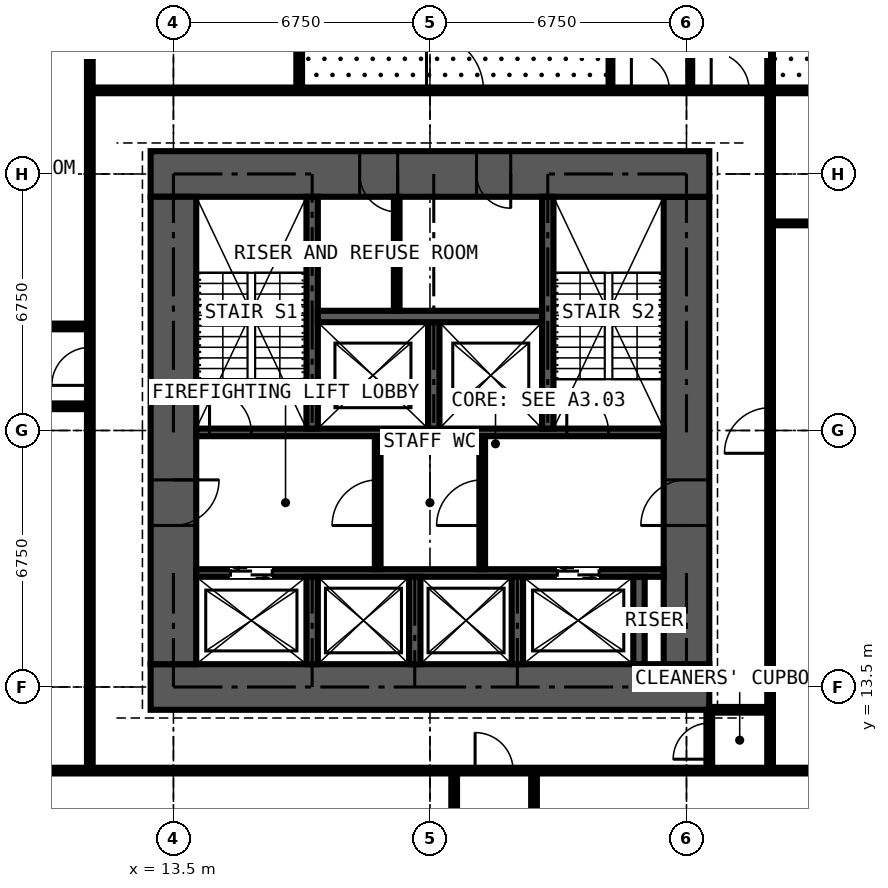
"""IFC4 building model, lengths in metres.
Left out: names, types, materials, properties, quantities, classifications, styles, units other than length and angle.
Written with IfcOpenShell. Run it as: python <this file> out.ifc"""

import sys

from ifc_helpers import new_model, si_unit, direction, frame, frame_2d, origin, place, context, subcontext, project, spatial, rectangle, extrude, element, fill, save


model = new_model("IFC4")
c1 = context("Model", 3, precision=1e-05, world=origin(), true_north=direction((0.0, 1.0)))
c2 = subcontext(c1, "Body", "Model", "MODEL_VIEW")
j1 = project(units=[si_unit("LENGTHUNIT", "METRE"), si_unit("PLANEANGLEUNIT", "RADIAN")], contexts=[c1])
p1 = place(None, origin())
s1 = spatial("IfcSite", under=j1, at=p1, CompositionType="ELEMENT")
p2 = place(p1, origin())
s2 = spatial("IfcBuilding", under=s1, at=p2, CompositionType="ELEMENT")
p3 = place(p2, frame((0.0, 0.0, 46.8)))
s3 = spatial("IfcBuildingStorey", under=s2, at=p3, CompositionType="ELEMENT", Elevation=46.8)
p4 = place(p3, frame((12.9, 13.5, 0.0), z_axis=(0.0, 0.0, 1.0), x_axis=(1.0, 0.0, 0.0)))
e1 = element("IfcWall", 1, at=p4, inside=s3, PredefinedType="SHEAR", context=c2, shape_type="SweptSolid", body=[
    extrude(rectangle(XDim=14.7, YDim=1.2, at=frame_2d((7.35, 0.0))), origin(), (0.0, 0.0, 1.0), 3.6),
])
p5 = place(p3, frame((27.0, 14.1, 0.0), z_axis=(0.0, 0.0, 1.0), x_axis=(0.0, 1.0, 0.0)))
e2 = element("IfcWall", 2, at=p5, inside=s3, PredefinedType="SHEAR", context=c2, shape_type="SweptSolid", body=[
    extrude(rectangle(XDim=12.3, YDim=1.2, at=frame_2d((6.15, 0.0))), origin(), (0.0, 0.0, 1.0), 3.6),
])
p6 = place(p5, frame((3.65, 0.0, 0.0)))
e3 = element("IfcOpeningElement", 3, at=p6, cuts=e2, PredefinedType="OPENING", context=c2, shape_type="SweptSolid", body=[
    extrude(rectangle(XDim=1.2, YDim=2.2, at=frame_2d((0.6, 1.1))), frame((0.0, 0.61, 0.0), z_axis=(0.0, -1.0, 0.0), x_axis=(1.0, 0.0, 0.0)), (0.0, 0.0, 1.0), 1.22),
])
p7 = place(p3, frame((27.6, 27.0, 0.0), z_axis=(0.0, 0.0, 1.0), x_axis=(-1.0, 0.0, 0.0)))
e4 = element("IfcWall", 4, at=p7, inside=s3, PredefinedType="SHEAR", context=c2, shape_type="SweptSolid", body=[
    extrude(rectangle(XDim=14.7, YDim=1.2, at=frame_2d((7.35, 0.0))), origin(), (0.0, 0.0, 1.0), 3.6),
])
p8 = place(p7, frame((5.225, 0.0, 0.0)))
e5 = element("IfcOpeningElement", 5, at=p8, cuts=e4, PredefinedType="OPENING", context=c2, shape_type="SweptSolid", body=[
    extrude(rectangle(XDim=0.9, YDim=2.2, at=frame_2d((0.45, 1.1))), frame((0.0, 0.61, 0.0), z_axis=(0.0, -1.0, 0.0), x_axis=(1.0, 0.0, 0.0)), (0.0, 0.0, 1.0), 1.22),
])
p9 = place(p7, frame((8.2, 0.0, 0.0)))
e6 = element("IfcOpeningElement", 6, at=p9, cuts=e4, PredefinedType="OPENING", context=c2, shape_type="SweptSolid", body=[
    extrude(rectangle(XDim=1.0, YDim=2.2, at=frame_2d((0.5, 1.1))), frame((0.0, 0.61, 0.0), z_axis=(0.0, -1.0, 0.0), x_axis=(1.0, 0.0, 0.0)), (0.0, 0.0, 1.0), 1.22),
])
p10 = place(p3, frame((13.5, 26.4, 0.0), z_axis=(0.0, 0.0, 1.0), x_axis=(0.0, -1.0, 0.0)))
e7 = element("IfcWall", 7, at=p10, inside=s3, PredefinedType="SHEAR", context=c2, shape_type="SweptSolid", body=[
    extrude(rectangle(XDim=12.3, YDim=1.2, at=frame_2d((6.15, 0.0))), origin(), (0.0, 0.0, 1.0), 3.6),
])
p11 = place(p10, frame((7.45, 0.0, 0.0)))
e8 = element("IfcOpeningElement", 8, at=p11, cuts=e7, PredefinedType="OPENING", context=c2, shape_type="SweptSolid", body=[
    extrude(rectangle(XDim=1.2, YDim=2.2, at=frame_2d((0.6, 1.1))), frame((0.0, 0.61, 0.0), z_axis=(0.0, -1.0, 0.0), x_axis=(1.0, 0.0, 0.0)), (0.0, 0.0, 1.0), 1.22),
])
p12 = place(p3, frame((14.1, 16.5, 0.0), z_axis=(0.0, 0.0, 1.0), x_axis=(1.0, 0.0, 0.0)))
e9 = element("IfcWall", 9, at=p12, inside=s3, PredefinedType="SHEAR", context=c2, shape_type="SweptSolid", body=[
    extrude(rectangle(XDim=12.3, YDim=0.2, at=frame_2d((6.15, 0.0))), origin(), (0.0, 0.0, 1.0), 3.6),
])
p13 = place(p12, frame((0.9, 0.0, 0.0)))
e10 = element("IfcOpeningElement", 10, at=p13, cuts=e9, PredefinedType="OPENING", context=c2, shape_type="SweptSolid", body=[
    extrude(rectangle(XDim=1.1, YDim=2.2, at=frame_2d((0.55, 1.1))), frame((0.0, 0.11, 0.0), z_axis=(0.0, -1.0, 0.0), x_axis=(1.0, 0.0, 0.0)), (0.0, 0.0, 1.0), 0.22),
])
p14 = place(p12, frame((9.5, 0.0, 0.0)))
e11 = element("IfcOpeningElement", 11, at=p14, cuts=e9, PredefinedType="OPENING", context=c2, shape_type="SweptSolid", body=[
    extrude(rectangle(XDim=1.1, YDim=2.2, at=frame_2d((0.55, 1.1))), frame((0.0, 0.11, 0.0), z_axis=(0.0, -1.0, 0.0), x_axis=(1.0, 0.0, 0.0)), (0.0, 0.0, 1.0), 0.22),
])
p15 = place(p3, frame((14.1, 20.2, 0.0), z_axis=(0.0, 0.0, 1.0), x_axis=(1.0, 0.0, 0.0)))
e12 = element("IfcWall", 12, at=p15, inside=s3, PredefinedType="SHEAR", context=c2, shape_type="SweptSolid", body=[
    extrude(rectangle(XDim=12.3, YDim=0.2, at=frame_2d((6.15, 0.0))), origin(), (0.0, 0.0, 1.0), 3.6),
])
p16 = place(p15, frame((0.35, 0.0, 0.0)))
e13 = element("IfcOpeningElement", 13, at=p16, cuts=e12, PredefinedType="OPENING", context=c2, shape_type="SweptSolid", body=[
    extrude(rectangle(XDim=1.1, YDim=2.2, at=frame_2d((0.55, 1.1))), frame((0.0, 0.11, 0.0), z_axis=(0.0, -1.0, 0.0), x_axis=(1.0, 0.0, 0.0)), (0.0, 0.0, 1.0), 0.22),
])
p17 = place(p15, frame((9.75, 0.0, 0.0)))
e14 = element("IfcOpeningElement", 14, at=p17, cuts=e12, PredefinedType="OPENING", context=c2, shape_type="SweptSolid", body=[
    extrude(rectangle(XDim=1.1, YDim=2.2, at=frame_2d((0.55, 1.1))), frame((0.0, 0.11, 0.0), z_axis=(0.0, -1.0, 0.0), x_axis=(1.0, 0.0, 0.0)), (0.0, 0.0, 1.0), 0.22),
])
for number, where, z_axis, x_axis in (
    (15, (17.15, 20.3, 0.0), (0.0, 0.0, 1.0), (0.0, 1.0, 0.0)),
    (16, (23.35, 20.3, 0.0), (0.0, 0.0, 1.0), (0.0, 1.0, 0.0)),
):
    element("IfcWall", number, at=place(p3, frame(where, z_axis=z_axis, x_axis=x_axis)), inside=s3, PredefinedType="SHEAR", context=c2, shape_type="SweptSolid", body=[
        extrude(rectangle(XDim=6.1, YDim=0.3, at=frame_2d((3.05, 0.0))), origin(), (0.0, 0.0, 1.0), 3.6),
    ])
p18 = place(p3, frame((20.35, 20.3, 0.0), z_axis=(0.0, 0.0, 1.0), x_axis=(0.0, 1.0, 0.0)))
e17 = element("IfcWall", 17, at=p18, inside=s3, PredefinedType="SHEAR", context=c2, shape_type="SweptSolid", body=[
    extrude(rectangle(XDim=2.8, YDim=0.3, at=frame_2d((1.4, 0.0))), origin(), (0.0, 0.0, 1.0), 3.6),
])
p19 = place(p3, frame((17.3, 23.25, 0.0), z_axis=(0.0, 0.0, 1.0), x_axis=(1.0, 0.0, 0.0)))
e18 = element("IfcWall", 18, at=p19, inside=s3, PredefinedType="SHEAR", context=c2, shape_type="SweptSolid", body=[
    extrude(rectangle(XDim=5.9, YDim=0.3, at=frame_2d((2.95, 0.0))), origin(), (0.0, 0.0, 1.0), 3.6),
])
for number, where, z_axis, x_axis in (
    (19, (17.15, 14.1, 0.0), (0.0, 0.0, 1.0), (0.0, 1.0, 0.0)),
    (20, (19.85, 14.1, 0.0), (0.0, 0.0, 1.0), (0.0, 1.0, 0.0)),
    (21, (22.55, 14.1, 0.0), (0.0, 0.0, 1.0), (0.0, 1.0, 0.0)),
    (22, (25.75, 14.1, 0.0), (0.0, 0.0, 1.0), (0.0, 1.0, 0.0)),
):
    element("IfcWall", number, at=place(p3, frame(where, z_axis=z_axis, x_axis=x_axis)), inside=s3, PredefinedType="SHEAR", context=c2, shape_type="SweptSolid", body=[
        extrude(rectangle(XDim=2.3, YDim=0.3, at=frame_2d((1.15, 0.0))), origin(), (0.0, 0.0, 1.0), 3.6),
    ])
p20 = place(p3, frame((18.875, 16.6, 0.0), z_axis=(0.0, 0.0, 1.0), x_axis=(0.0, 1.0, 0.0)))
e23 = element("IfcWall", 23, at=p20, inside=s3, PredefinedType="PARTITIONING", context=c2, shape_type="SweptSolid", body=[
    extrude(rectangle(XDim=3.5, YDim=0.15, at=frame_2d((1.75, 0.0))), origin(), (0.0, 0.0, 1.0), 3.375),
])
p21 = place(p20, frame((1.15, 0.0, 0.0)))
e24 = element("IfcOpeningElement", 24, at=p21, cuts=e23, PredefinedType="OPENING", context=c2, shape_type="SweptSolid", body=[
    extrude(rectangle(XDim=1.2, YDim=2.2, at=frame_2d((0.6, 1.1))), frame((0.0, 0.085, 0.0), z_axis=(0.0, -1.0, 0.0), x_axis=(1.0, 0.0, 0.0)), (0.0, 0.0, 1.0), 0.17),
])
p22 = place(p3, frame((21.625, 16.6, 0.0), z_axis=(0.0, 0.0, 1.0), x_axis=(0.0, 1.0, 0.0)))
e25 = element("IfcWall", 25, at=p22, inside=s3, PredefinedType="PARTITIONING", context=c2, shape_type="SweptSolid", body=[
    extrude(rectangle(XDim=3.5, YDim=0.15, at=frame_2d((1.75, 0.0))), origin(), (0.0, 0.0, 1.0), 3.375),
])
p23 = place(p22, frame((1.15, 0.0, 0.0)))
e26 = element("IfcOpeningElement", 26, at=p23, cuts=e25, PredefinedType="OPENING", context=c2, shape_type="SweptSolid", body=[
    extrude(rectangle(XDim=1.2, YDim=2.2, at=frame_2d((0.6, 1.1))), frame((0.0, 0.085, 0.0), z_axis=(0.0, -1.0, 0.0), x_axis=(1.0, 0.0, 0.0)), (0.0, 0.0, 1.0), 0.17),
])
p24 = place(p3, frame((19.375, 23.4, 0.0), z_axis=(0.0, 0.0, 1.0), x_axis=(0.0, 1.0, 0.0)))
e27 = element("IfcWall", 27, at=p24, inside=s3, PredefinedType="PARTITIONING", context=c2, shape_type="SweptSolid", body=[
    extrude(rectangle(XDim=3.0, YDim=0.15, at=frame_2d((1.5, 0.0))), origin(), (0.0, 0.0, 1.0), 3.375),
])
for number, where, z_axis, x_axis in (
    (28, (5.65, 20.887, 0.0), (0.0, 0.0, 1.0), (1.0, 0.0, 0.0)),
    (29, (5.65, 22.988, 0.0), (0.0, 0.0, 1.0), (1.0, 0.0, 0.0)),
):
    element("IfcWall", number, at=place(p3, frame(where, z_axis=z_axis, x_axis=x_axis)), inside=s3, PredefinedType="PARTITIONING", context=c2, shape_type="SweptSolid", body=[
        extrude(rectangle(XDim=5.65, YDim=0.15, at=frame_2d((2.825, 0.0))), origin(), (0.0, 0.0, 1.0), 3.375),
    ])
p25 = place(p3, frame((10.125, 11.3, 0.0), z_axis=(0.0, 0.0, 1.0), x_axis=(1.0, 0.0, 0.0)))
e30 = element("IfcWall", 30, at=p25, inside=s3, PredefinedType="PARTITIONING", context=c2, shape_type="SweptSolid", body=[
    extrude(rectangle(XDim=20.675, YDim=0.15, at=frame_2d((10.337, 0.0))), origin(), (0.0, 0.0, 1.0), 3.375),
])
p26 = place(p25, frame((11.312, 0.0, 0.0)))
e31 = element("IfcOpeningElement", 31, at=p26, cuts=e30, PredefinedType="OPENING", context=c2, shape_type="SweptSolid", body=[
    extrude(rectangle(XDim=1.0, YDim=2.2, at=frame_2d((0.5, 1.1))), frame((0.0, 0.085, 0.0), z_axis=(0.0, -1.0, 0.0), x_axis=(1.0, 0.0, 0.0)), (0.0, 0.0, 1.0), 0.17),
])
p27 = place(p3, frame((11.3, 11.3, 0.0), z_axis=(0.0, 0.0, 1.0), x_axis=(0.0, 1.0, 0.0)))
e32 = element("IfcWall", 32, at=p27, inside=s3, PredefinedType="PARTITIONING", context=c2, shape_type="SweptSolid", body=[
    extrude(rectangle(XDim=19.075, YDim=0.15, at=frame_2d((9.538, 0.0))), origin(), (0.0, 0.0, 1.0), 3.375),
])
p28 = place(p27, frame((10.137, 0.0, 0.0)))
e33 = element("IfcOpeningElement", 33, at=p28, cuts=e32, PredefinedType="OPENING", context=c2, shape_type="SweptSolid", body=[
    extrude(rectangle(XDim=1.0, YDim=2.2, at=frame_2d((0.5, 1.1))), frame((0.0, 0.085, 0.0), z_axis=(0.0, -1.0, 0.0), x_axis=(1.0, 0.0, 0.0)), (0.0, 0.0, 1.0), 0.17),
])
p29 = place(p3, frame((11.3, 29.2, 0.0), z_axis=(0.0, 0.0, 1.0), x_axis=(1.0, 0.0, 0.0)))
e34 = element("IfcWall", 34, at=p29, inside=s3, PredefinedType="PARTITIONING", context=c2, shape_type="SweptSolid", body=[
    extrude(rectangle(XDim=19.075, YDim=0.15, at=frame_2d((9.538, 0.0))), origin(), (0.0, 0.0, 1.0), 3.375),
])
p30 = place(p29, frame((14.25, 0.0, 0.0)))
e35 = element("IfcOpeningElement", 35, at=p30, cuts=e34, PredefinedType="OPENING", context=c2, shape_type="SweptSolid", body=[
    extrude(rectangle(XDim=1.0, YDim=2.2, at=frame_2d((0.5, 1.1))), frame((0.0, 0.085, 0.0), z_axis=(0.0, -1.0, 0.0), x_axis=(1.0, 0.0, 0.0)), (0.0, 0.0, 1.0), 0.17),
])
p31 = place(p29, frame((16.35, 0.0, 0.0)))
e36 = element("IfcOpeningElement", 36, at=p31, cuts=e34, PredefinedType="OPENING", context=c2, shape_type="SweptSolid", body=[
    extrude(rectangle(XDim=1.0, YDim=2.2, at=frame_2d((0.5, 1.1))), frame((0.0, 0.085, 0.0), z_axis=(0.0, -1.0, 0.0), x_axis=(1.0, 0.0, 0.0)), (0.0, 0.0, 1.0), 0.17),
])
p32 = place(p29, frame((8.859, 0.0, 0.0)))
e37 = element("IfcOpeningElement", 37, at=p32, cuts=e34, PredefinedType="OPENING", context=c2, shape_type="SweptSolid", body=[
    extrude(rectangle(XDim=1.5, YDim=2.2, at=frame_2d((0.75, 1.1))), frame((0.0, 0.085, 0.0), z_axis=(0.0, -1.0, 0.0), x_axis=(1.0, 0.0, 0.0)), (0.0, 0.0, 1.0), 0.17),
])
p33 = place(p3, frame((16.809, 29.2, 0.0), z_axis=(0.0, 0.0, 1.0), x_axis=(0.0, 1.0, 0.0)))
e38 = element("IfcWall", 38, at=p33, inside=s3, PredefinedType="PARTITIONING", context=c2, shape_type="SweptSolid", body=[
    extrude(rectangle(XDim=12.034, YDim=0.15, at=frame_2d((6.017, 0.0))), origin(), (0.0, 0.0, 1.0), 3.375),
])
p34 = place(p33, frame((5.2, 0.0, 0.0)))
e39 = element("IfcOpeningElement", 39, at=p34, cuts=e38, PredefinedType="OPENING", context=c2, shape_type="SweptSolid", body=[
    extrude(rectangle(XDim=1.6, YDim=2.4, at=frame_2d((0.8, 1.2))), frame((0.0, 0.085, 0.0), z_axis=(0.0, -1.0, 0.0), x_axis=(1.0, 0.0, 0.0)), (0.0, 0.0, 1.0), 0.17),
])
for number, where, z_axis, x_axis in (
    (40, (20.887, 5.65, 0.0), (0.0, 0.0, 1.0), (0.0, 1.0, 0.0)),
    (41, (22.988, 5.65, 0.0), (0.0, 0.0, 1.0), (0.0, 1.0, 0.0)),
):
    element("IfcWall", number, at=place(p3, frame(where, z_axis=z_axis, x_axis=x_axis)), inside=s3, PredefinedType="PARTITIONING", context=c2, shape_type="SweptSolid", body=[
        extrude(rectangle(XDim=5.65, YDim=0.15, at=frame_2d((2.825, 0.0))), origin(), (0.0, 0.0, 1.0), 3.375),
    ])
p35 = place(p3, frame((25.0, 29.2, 0.0), z_axis=(0.0, 0.0, 1.0), x_axis=(0.0, 1.0, 0.0)))
e42 = element("IfcWall", 42, at=p35, inside=s3, PredefinedType="PARTITIONING", context=c2, shape_type="SweptSolid", body=[
    extrude(rectangle(XDim=2.4, YDim=0.1, at=frame_2d((1.2, 0.0))), origin(), (0.0, 0.0, 1.0), 3.375),
])
p36 = place(p3, frame((27.1, 29.2, 0.0), z_axis=(0.0, 0.0, 1.0), x_axis=(0.0, 1.0, 0.0)))
e43 = element("IfcWall", 43, at=p36, inside=s3, PredefinedType="PARTITIONING", context=c2, shape_type="SweptSolid", body=[
    extrude(rectangle(XDim=2.4, YDim=0.1, at=frame_2d((1.2, 0.0))), origin(), (0.0, 0.0, 1.0), 2.877),
])
p37 = place(p3, frame((27.6, 11.3, 0.0), z_axis=(0.0, 0.0, 1.0), x_axis=(0.0, 1.0, 0.0)))
e44 = element("IfcWall", 44, at=p37, inside=s3, PredefinedType="PARTITIONING", context=c2, shape_type="SweptSolid", body=[
    extrude(rectangle(XDim=1.6, YDim=0.15, at=frame_2d((0.8, 0.0))), origin(), (0.0, 0.0, 1.0), 3.375),
])
p38 = place(p37, frame((0.3, 0.0, 0.0)))
e45 = element("IfcOpeningElement", 45, at=p38, cuts=e44, PredefinedType="OPENING", context=c2, shape_type="SweptSolid", body=[
    extrude(rectangle(XDim=0.95, YDim=2.2, at=frame_2d((0.475, 1.1))), frame((0.0, 0.085, 0.0), z_axis=(0.0, -1.0, 0.0), x_axis=(1.0, 0.0, 0.0)), (0.0, 0.0, 1.0), 0.17),
])
p39 = place(p3, frame((27.6, 12.9, 0.0), z_axis=(0.0, 0.0, 1.0), x_axis=(1.0, 0.0, 0.0)))
e46 = element("IfcWall", 46, at=p39, inside=s3, PredefinedType="PARTITIONING", context=c2, shape_type="SweptSolid", body=[
    extrude(rectangle(XDim=1.6, YDim=0.15, at=frame_2d((0.8, 0.0))), origin(), (0.0, 0.0, 1.0), 2.877),
])
p40 = place(p3, frame((29.2, 11.3, 0.0), z_axis=(0.0, 0.0, 1.0), x_axis=(0.0, 1.0, 0.0)))
e47 = element("IfcWall", 47, at=p40, inside=s3, PredefinedType="PARTITIONING", context=c2, shape_type="SweptSolid", body=[
    extrude(rectangle(XDim=20.3, YDim=0.15, at=frame_2d((10.15, 0.0))), origin(), (0.0, 0.0, 1.0), 3.375),
])
p41 = place(p40, frame((8.35, 0.0, 0.0)))
e48 = element("IfcOpeningElement", 48, at=p41, cuts=e47, PredefinedType="OPENING", context=c2, shape_type="SweptSolid", body=[
    extrude(rectangle(XDim=1.2, YDim=2.2, at=frame_2d((0.6, 1.1))), frame((0.0, 0.085, 0.0), z_axis=(0.0, -1.0, 0.0), x_axis=(1.0, 0.0, 0.0)), (0.0, 0.0, 1.0), 0.17),
])
p42 = place(p3, frame((29.2, 25.7, 0.0), z_axis=(0.0, 0.0, 1.0), x_axis=(1.0, 0.0, 0.0)))
e49 = element("IfcWall", 49, at=p42, inside=s3, PredefinedType="SHEAR", context=c2, shape_type="SweptSolid", body=[
    extrude(rectangle(XDim=3.45, YDim=0.1, at=frame_2d((1.725, 0.0))), origin(), (0.0, 0.0, 1.0), 3.375),
])
p43 = place(p13, origin())
e50 = element("IfcDoor", 50, at=p43, inside=s3, OperationType="DOUBLE_DOOR_SLIDING", PredefinedType="DOOR", context=c2, shape_type="SweptSolid", body=[
    extrude(rectangle(XDim=1.1, YDim=2.2, at=frame_2d((0.55, 1.1))), frame((0.0, 0.025, 0.0), z_axis=(0.0, -1.0, 0.0), x_axis=(1.0, 0.0, 0.0)), (0.0, 0.0, 1.0), 0.05),
])
fill(e10, e50)
p44 = place(p14, origin())
e51 = element("IfcDoor", 51, at=p44, inside=s3, OperationType="DOUBLE_DOOR_SLIDING", PredefinedType="DOOR", context=c2, shape_type="SweptSolid", body=[
    extrude(rectangle(XDim=1.1, YDim=2.2, at=frame_2d((0.55, 1.1))), frame((0.0, 0.025, 0.0), z_axis=(0.0, -1.0, 0.0), x_axis=(1.0, 0.0, 0.0)), (0.0, 0.0, 1.0), 0.05),
])
fill(e11, e51)
p45 = place(p11, origin())
e52 = element("IfcDoor", 52, at=p45, inside=s3, OperationType="DOUBLE_DOOR_SINGLE_SWING", PredefinedType="DOOR", context=c2, shape_type="SweptSolid", body=[
    extrude(rectangle(XDim=1.2, YDim=2.2, at=frame_2d((0.6, 1.1))), frame((0.0, 0.025, 0.0), z_axis=(0.0, -1.0, 0.0), x_axis=(1.0, 0.0, 0.0)), (0.0, 0.0, 1.0), 0.05),
])
fill(e8, e52)
p46 = place(p6, origin())
e53 = element("IfcDoor", 53, at=p46, inside=s3, OperationType="DOUBLE_DOOR_SINGLE_SWING", PredefinedType="DOOR", context=c2, shape_type="SweptSolid", body=[
    extrude(rectangle(XDim=1.2, YDim=2.2, at=frame_2d((0.6, 1.1))), frame((0.0, 0.025, 0.0), z_axis=(0.0, -1.0, 0.0), x_axis=(1.0, 0.0, 0.0)), (0.0, 0.0, 1.0), 0.05),
])
fill(e3, e53)
p47 = place(p21, origin())
e54 = element("IfcDoor", 54, at=p47, inside=s3, OperationType="DOUBLE_DOOR_SINGLE_SWING", PredefinedType="DOOR", context=c2, shape_type="SweptSolid", body=[
    extrude(rectangle(XDim=1.2, YDim=2.2, at=frame_2d((0.6, 1.1))), frame((0.0, 0.025, 0.0), z_axis=(0.0, -1.0, 0.0), x_axis=(1.0, 0.0, 0.0)), (0.0, 0.0, 1.0), 0.05),
])
fill(e24, e54)
p48 = place(p23, origin())
e55 = element("IfcDoor", 55, at=p48, inside=s3, OperationType="DOUBLE_DOOR_SINGLE_SWING", PredefinedType="DOOR", context=c2, shape_type="SweptSolid", body=[
    extrude(rectangle(XDim=1.2, YDim=2.2, at=frame_2d((0.6, 1.1))), frame((0.0, 0.025, 0.0), z_axis=(0.0, -1.0, 0.0), x_axis=(1.0, 0.0, 0.0)), (0.0, 0.0, 1.0), 0.05),
])
fill(e26, e55)
p49 = place(p8, origin())
e56 = element("IfcDoor", 56, at=p49, inside=s3, OperationType="SINGLE_SWING_LEFT", PredefinedType="DOOR", context=c2, shape_type="SweptSolid", body=[
    extrude(rectangle(XDim=0.9, YDim=2.2, at=frame_2d((0.45, 1.1))), frame((0.0, 0.4, 0.0), z_axis=(0.0, -1.0, 0.0), x_axis=(1.0, 0.0, 0.0)), (0.0, 0.0, 1.0), 0.8),
])
fill(e5, e56)
p50 = place(p9, origin())
e57 = element("IfcDoor", 57, at=p50, inside=s3, OperationType="SINGLE_SWING_LEFT", PredefinedType="DOOR", context=c2, shape_type="SweptSolid", body=[
    extrude(rectangle(XDim=1.0, YDim=2.2, at=frame_2d((0.5, 1.1))), frame((0.0, 0.025, 0.0), z_axis=(0.0, -1.0, 0.0), x_axis=(1.0, 0.0, 0.0)), (0.0, 0.0, 1.0), 0.05),
])
fill(e6, e57)
p51 = place(p16, origin())
e58 = element("IfcDoor", 58, at=p51, inside=s3, OperationType="SINGLE_SWING_LEFT", PredefinedType="DOOR", context=c2, shape_type="SweptSolid", body=[
    extrude(rectangle(XDim=1.1, YDim=2.2, at=frame_2d((0.55, 1.1))), frame((0.0, 0.025, 0.0), z_axis=(0.0, -1.0, 0.0), x_axis=(1.0, 0.0, 0.0)), (0.0, 0.0, 1.0), 0.05),
])
fill(e13, e58)
p52 = place(p17, origin())
e59 = element("IfcDoor", 59, at=p52, inside=s3, OperationType="SINGLE_SWING_LEFT", PredefinedType="DOOR", context=c2, shape_type="SweptSolid", body=[
    extrude(rectangle(XDim=1.1, YDim=2.2, at=frame_2d((0.55, 1.1))), frame((0.0, 0.025, 0.0), z_axis=(0.0, -1.0, 0.0), x_axis=(1.0, 0.0, 0.0)), (0.0, 0.0, 1.0), 0.05),
])
fill(e14, e59)
p53 = place(p38, origin())
e60 = element("IfcDoor", 60, at=p53, inside=s3, OperationType="SINGLE_SWING_LEFT", PredefinedType="DOOR", context=c2, shape_type="SweptSolid", body=[
    extrude(rectangle(XDim=0.95, YDim=2.2, at=frame_2d((0.475, 1.1))), frame((0.0, 0.025, 0.0), z_axis=(0.0, -1.0, 0.0), x_axis=(1.0, 0.0, 0.0)), (0.0, 0.0, 1.0), 0.05),
])
fill(e45, e60)
p54 = place(p26, origin())
e61 = element("IfcDoor", 61, at=p54, inside=s3, OperationType="SINGLE_SWING_LEFT", PredefinedType="DOOR", context=c2, shape_type="SweptSolid", body=[
    extrude(rectangle(XDim=1.0, YDim=2.2, at=frame_2d((0.5, 1.1))), frame((0.0, 0.025, 0.0), z_axis=(0.0, -1.0, 0.0), x_axis=(1.0, 0.0, 0.0)), (0.0, 0.0, 1.0), 0.05),
])
fill(e31, e61)
p55 = place(p30, origin())
e62 = element("IfcDoor", 62, at=p55, inside=s3, OperationType="SINGLE_SWING_LEFT", PredefinedType="DOOR", context=c2, shape_type="SweptSolid", body=[
    extrude(rectangle(XDim=1.0, YDim=2.2, at=frame_2d((0.5, 1.1))), frame((0.0, 0.025, 0.0), z_axis=(0.0, -1.0, 0.0), x_axis=(1.0, 0.0, 0.0)), (0.0, 0.0, 1.0), 0.05),
])
fill(e35, e62)
p56 = place(p31, origin())
e63 = element("IfcDoor", 63, at=p56, inside=s3, OperationType="SINGLE_SWING_LEFT", PredefinedType="DOOR", context=c2, shape_type="SweptSolid", body=[
    extrude(rectangle(XDim=1.0, YDim=2.2, at=frame_2d((0.5, 1.1))), frame((0.0, 0.025, 0.0), z_axis=(0.0, -1.0, 0.0), x_axis=(1.0, 0.0, 0.0)), (0.0, 0.0, 1.0), 0.05),
])
fill(e36, e63)
p57 = place(p32, origin())
e64 = element("IfcDoor", 64, at=p57, inside=s3, OperationType="DOUBLE_DOOR_SINGLE_SWING", PredefinedType="DOOR", context=c2, shape_type="SweptSolid", body=[
    extrude(rectangle(XDim=1.5, YDim=2.2, at=frame_2d((0.75, 1.1))), frame((0.0, 0.025, 0.0), z_axis=(0.0, -1.0, 0.0), x_axis=(1.0, 0.0, 0.0)), (0.0, 0.0, 1.0), 0.05),
])
fill(e37, e64)
p58 = place(p28, origin())
e65 = element("IfcDoor", 65, at=p58, inside=s3, OperationType="SINGLE_SWING_LEFT", PredefinedType="DOOR", context=c2, shape_type="SweptSolid", body=[
    extrude(rectangle(XDim=1.0, YDim=2.2, at=frame_2d((0.5, 1.1))), frame((0.0, 0.025, 0.0), z_axis=(0.0, -1.0, 0.0), x_axis=(1.0, 0.0, 0.0)), (0.0, 0.0, 1.0), 0.05),
])
fill(e33, e65)
p59 = place(p41, origin())
e66 = element("IfcDoor", 66, at=p59, inside=s3, OperationType="DOUBLE_DOOR_SINGLE_SWING", PredefinedType="DOOR", context=c2, shape_type="SweptSolid", body=[
    extrude(rectangle(XDim=1.2, YDim=2.2, at=frame_2d((0.6, 1.1))), frame((0.0, 0.025, 0.0), z_axis=(0.0, -1.0, 0.0), x_axis=(1.0, 0.0, 0.0)), (0.0, 0.0, 1.0), 0.05),
])
fill(e48, e66)
save(model, sys.argv[1])
